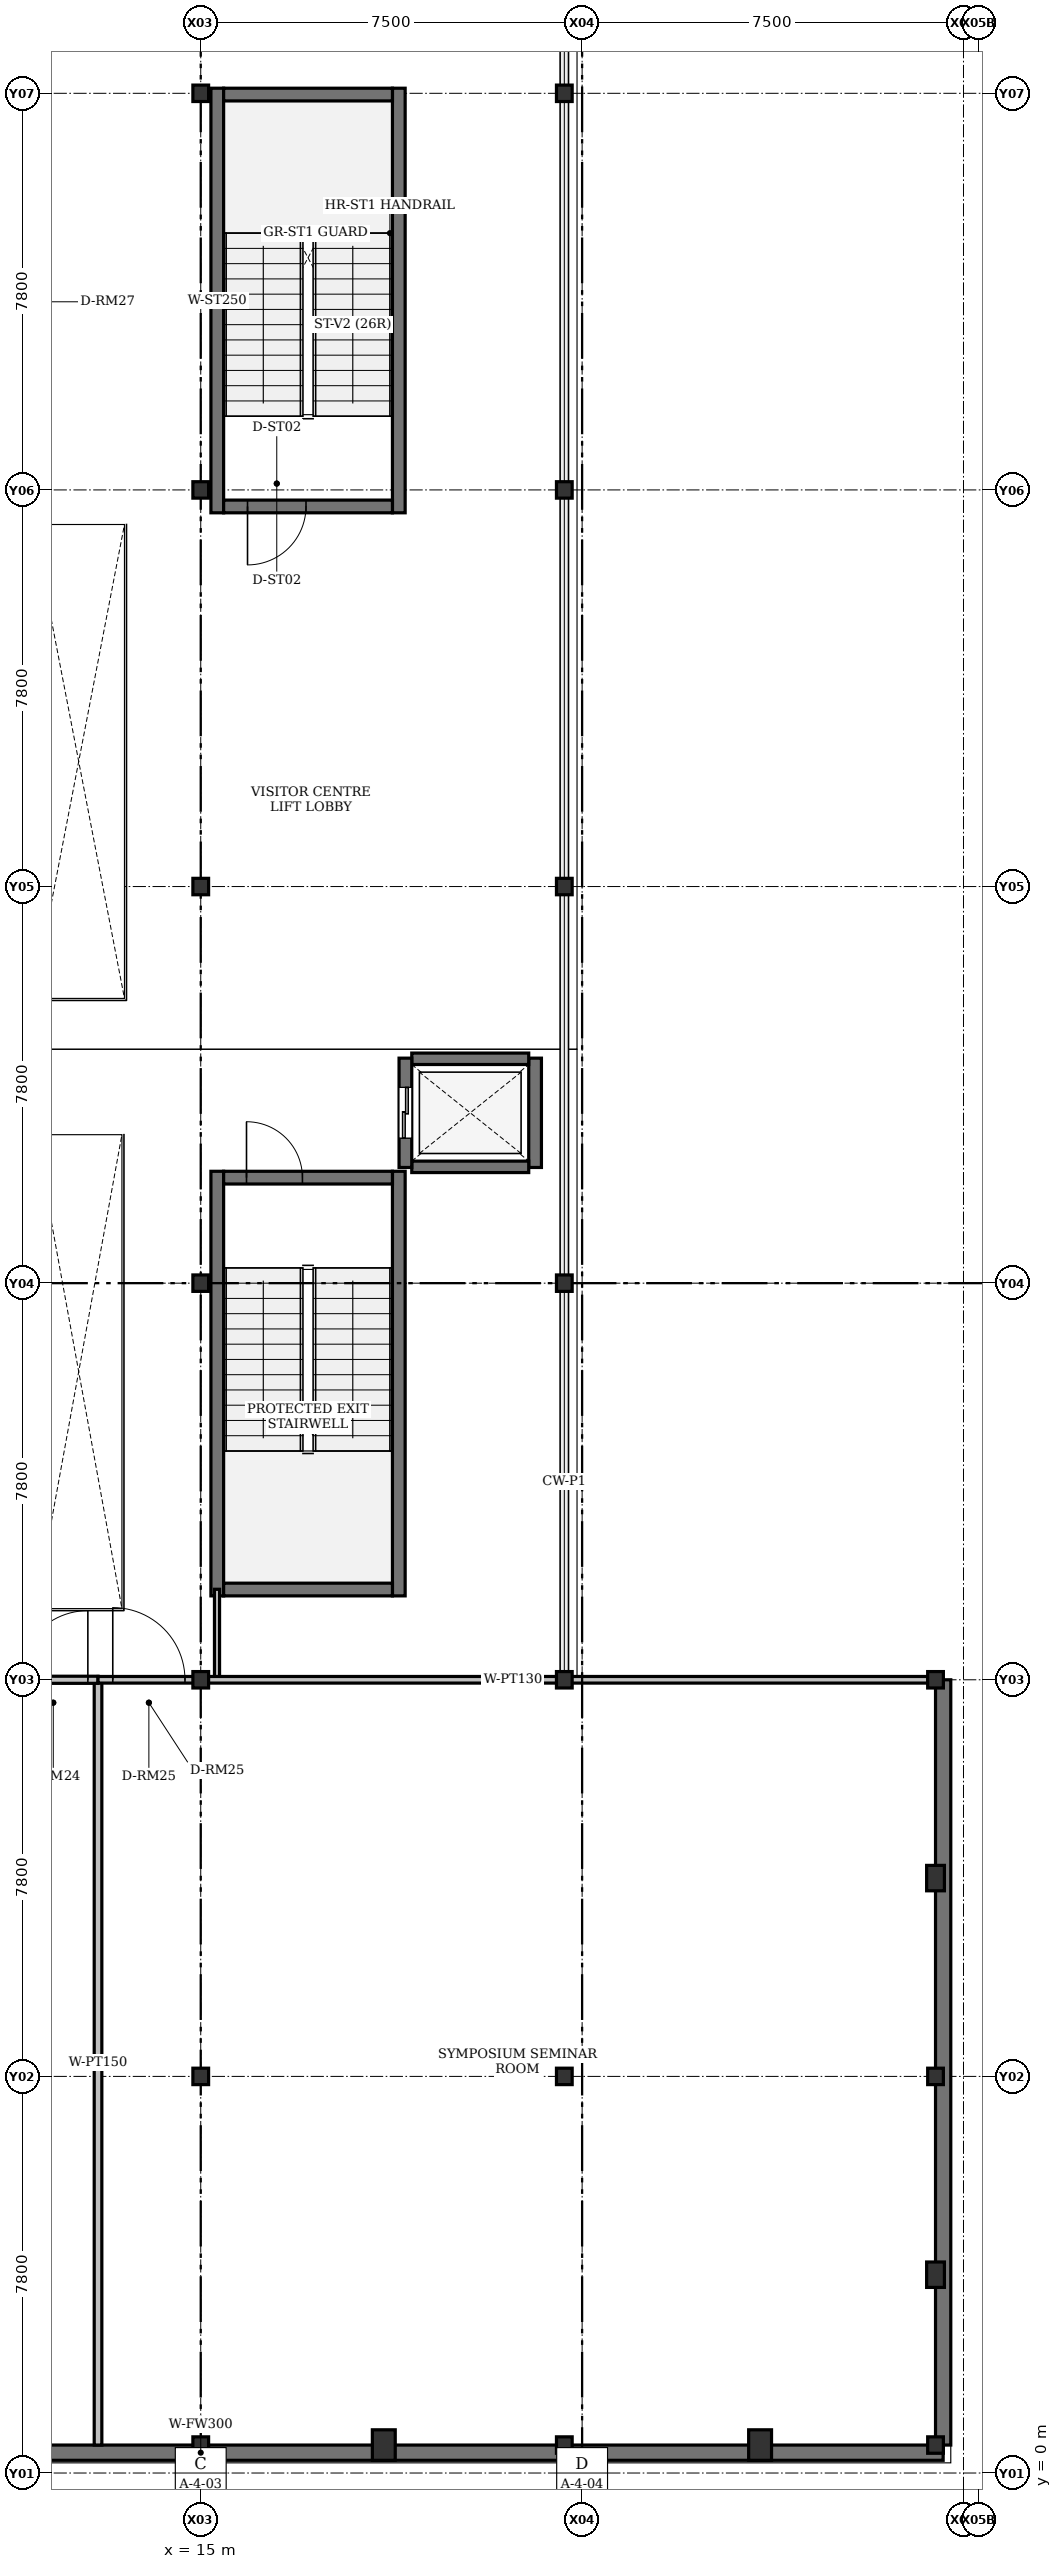
"""IFC4 building model, lengths in metres.
Left out: names, types, materials, properties, quantities, classifications, styles, units other than length and angle.
Written with IfcOpenShell. Run it as: python <this file> out.ifc"""

import sys

from ifc_helpers import new_model, si_unit, direction, frame, frame_2d, origin, origin_2d, place, context, subcontext, project, spatial, rectangle, i_section, extrude, element, fill, save


model = new_model("IFC4")
c1 = context("Model", 3, precision=1e-05, world=origin(), true_north=direction((0.0, 1.0)))
c2 = subcontext(c1, "Body", "Model", "MODEL_VIEW")
j1 = project(units=[si_unit("LENGTHUNIT", "METRE"), si_unit("PLANEANGLEUNIT", "RADIAN")], contexts=[c1])
p1 = place(None, origin())
s1 = spatial("IfcSite", under=j1, at=p1, CompositionType="ELEMENT")
p2 = place(p1, origin())
s2 = spatial("IfcBuilding", under=s1, at=p2, CompositionType="ELEMENT")
p3 = place(p2, frame((0.0, 0.0, 5.4)))
s3 = spatial("IfcBuildingStorey", under=s2, at=p3, CompositionType="ELEMENT", Elevation=5.4)
for number, where, z_axis, x_axis in (
    (1, (15.0, 0.55, 0.0), (0.0, 0.0, 1.0), (1.0, 0.0, 0.0)),
    (2, (15.0, 7.8, 0.0), (0.0, 0.0, 1.0), (1.0, 0.0, 0.0)),
    (3, (15.0, 15.6, 0.0), (0.0, 0.0, 1.0), (1.0, 0.0, 0.0)),
    (4, (15.0, 23.4, 0.0), (0.0, 0.0, 1.0), (1.0, 0.0, 0.0)),
    (5, (15.0, 31.2, 0.0), (0.0, 0.0, 1.0), (1.0, 0.0, 0.0)),
    (6, (15.0, 39.0, 0.0), (0.0, 0.0, 1.0), (1.0, 0.0, 0.0)),
    (7, (15.0, 46.8, 0.0), (0.0, 0.0, 1.0), (1.0, 0.0, 0.0)),
    (8, (22.15, 0.55, 0.0), (0.0, 0.0, 1.0), (1.0, 0.0, 0.0)),
    (9, (22.15, 7.8, 0.0), (0.0, 0.0, 1.0), (1.0, 0.0, 0.0)),
    (10, (22.15, 15.6, 0.0), (0.0, 0.0, 1.0), (1.0, 0.0, 0.0)),
    (11, (22.15, 23.4, 0.0), (0.0, 0.0, 1.0), (1.0, 0.0, 0.0)),
    (12, (22.15, 31.2, 0.0), (0.0, 0.0, 1.0), (1.0, 0.0, 0.0)),
    (13, (22.15, 39.0, 0.0), (0.0, 0.0, 1.0), (1.0, 0.0, 0.0)),
    (14, (22.15, 46.8, 0.0), (0.0, 0.0, 1.0), (1.0, 0.0, 0.0)),
    (15, (29.45, 0.55, 0.0), (0.0, 0.0, 1.0), (1.0, 0.0, 0.0)),
    (16, (29.45, 7.8, 0.0), (0.0, 0.0, 1.0), (1.0, 0.0, 0.0)),
    (17, (29.45, 15.6, 0.0), (0.0, 0.0, 1.0), (1.0, 0.0, 0.0)),
):
    element("IfcColumn", number, at=place(p3, frame(where, z_axis=z_axis, x_axis=x_axis)), inside=s3, PredefinedType="COLUMN", context=c2, shape_type="SweptSolid", body=[
        extrude(i_section(OverallWidth=0.309, OverallDepth=0.323, WebThickness=0.014, FlangeThickness=0.023, FilletRadius=0.015, at=origin_2d()), origin(), (0.0, 0.0, 1.0), 4.5),
    ])
for number, where, z_axis, x_axis in (
    (18, (18.6, 0.55, 0.0), (0.0, 0.0, 1.0), (1.0, 0.0, 0.0)),
    (19, (26.0, 0.55, 0.0), (0.0, 0.0, 1.0), (1.0, 0.0, 0.0)),
):
    element("IfcColumn", number, at=place(p3, frame(where, z_axis=z_axis, x_axis=x_axis)), inside=s3, PredefinedType="PILASTER", context=c2, shape_type="SweptSolid", body=[
        extrude(rectangle(XDim=0.45, YDim=0.6, at=origin_2d()), origin(), (0.0, 0.0, 1.0), 4.5),
    ])
for number, where, z_axis, x_axis in (
    (20, (29.45, 3.9, 0.0), (0.0, 0.0, 1.0), (1.0, 0.0, 0.0)),
    (21, (29.45, 11.7, 0.0), (0.0, 0.0, 1.0), (1.0, 0.0, 0.0)),
):
    element("IfcColumn", number, at=place(p3, frame(where, z_axis=z_axis, x_axis=x_axis)), inside=s3, PredefinedType="PILASTER", context=c2, shape_type="SweptSolid", body=[
        extrude(rectangle(XDim=0.35, YDim=0.5, at=origin_2d()), origin(), (0.0, 0.0, 1.0), 4.5),
    ])
p4 = place(p3, frame((29.6, 0.4, 0.0), z_axis=(0.0, 0.0, 1.0), x_axis=(-1.0, 0.0, 0.0)))
e22 = element("IfcWall", 22, at=p4, inside=s3, PredefinedType="SOLIDWALL", context=c2, shape_type="SweptSolid", body=[
    extrude(rectangle(XDim=29.2, YDim=0.3, at=frame_2d((14.6, 0.0))), origin(), (0.0, 0.0, 1.0), 4.31),
])
p5 = place(p3, frame((29.6, 15.6, 0.0), z_axis=(0.0, 0.0, 1.0), x_axis=(0.0, -1.0, 0.0)))
e23 = element("IfcWall", 23, at=p5, inside=s3, PredefinedType="SOLIDWALL", context=c2, shape_type="SweptSolid", body=[
    extrude(rectangle(XDim=15.05, YDim=0.3, at=frame_2d((7.525, 0.0))), origin(), (0.0, 0.0, 1.0), 4.31),
])
for number, where, z_axis, x_axis in (
    (24, (15.325, 17.25, 0.0), (0.0, 0.0, 1.0), (0.0, 1.0, 0.0)),
    (25, (18.895, 17.25, 0.0), (0.0, 0.0, 1.0), (0.0, 1.0, 0.0)),
):
    element("IfcWall", number, at=place(p3, frame(where, z_axis=z_axis, x_axis=x_axis)), inside=s3, PredefinedType="SHEAR", context=c2, shape_type="SweptSolid", body=[
        extrude(rectangle(XDim=8.35, YDim=0.25, at=frame_2d((4.175, 0.0))), origin(), (0.0, 0.0, 1.0), 4.5),
    ])
p6 = place(p3, frame((15.45, 17.375, 0.0), z_axis=(0.0, 0.0, 1.0), x_axis=(1.0, 0.0, 0.0)))
e26 = element("IfcWall", 26, at=p6, inside=s3, PredefinedType="SHEAR", context=c2, shape_type="SweptSolid", body=[
    extrude(rectangle(XDim=3.32, YDim=0.25, at=frame_2d((1.66, 0.0))), origin(), (0.0, 0.0, 1.0), 4.5),
])
p7 = place(p3, frame((15.45, 25.475, 0.0), z_axis=(0.0, 0.0, 1.0), x_axis=(1.0, 0.0, 0.0)))
e27 = element("IfcWall", 27, at=p7, inside=s3, PredefinedType="SHEAR", context=c2, shape_type="SweptSolid", body=[
    extrude(rectangle(XDim=3.32, YDim=0.25, at=frame_2d((1.66, 0.0))), origin(), (0.0, 0.0, 1.0), 4.5),
])
p8 = place(p7, frame((0.45, 0.0, 0.0)))
e28 = element("IfcOpeningElement", 28, at=p8, cuts=e27, PredefinedType="OPENING", context=c2, shape_type="SweptSolid", body=[
    extrude(rectangle(XDim=1.1, YDim=2.15, at=frame_2d((0.55, 1.075))), frame((0.0, 0.125, 0.0), z_axis=(0.0, -1.0, 0.0), x_axis=(1.0, 0.0, 0.0)), (0.0, 0.0, 1.0), 0.25),
])
for number, where, z_axis, x_axis in (
    (29, (15.325, 38.55, 0.0), (0.0, 0.0, 1.0), (0.0, 1.0, 0.0)),
    (30, (18.895, 38.55, 0.0), (0.0, 0.0, 1.0), (0.0, 1.0, 0.0)),
):
    element("IfcWall", number, at=place(p3, frame(where, z_axis=z_axis, x_axis=x_axis)), inside=s3, PredefinedType="SHEAR", context=c2, shape_type="SweptSolid", body=[
        extrude(rectangle(XDim=8.35, YDim=0.25, at=frame_2d((4.175, 0.0))), origin(), (0.0, 0.0, 1.0), 4.5),
    ])
p9 = place(p3, frame((15.45, 46.775, 0.0), z_axis=(0.0, 0.0, 1.0), x_axis=(1.0, 0.0, 0.0)))
e31 = element("IfcWall", 31, at=p9, inside=s3, PredefinedType="SHEAR", context=c2, shape_type="SweptSolid", body=[
    extrude(rectangle(XDim=3.32, YDim=0.25, at=frame_2d((1.66, 0.0))), origin(), (0.0, 0.0, 1.0), 4.5),
])
p10 = place(p3, frame((18.77, 38.675, 0.0), z_axis=(0.0, 0.0, 1.0), x_axis=(-1.0, 0.0, 0.0)))
e32 = element("IfcWall", 32, at=p10, inside=s3, PredefinedType="SHEAR", context=c2, shape_type="SweptSolid", body=[
    extrude(rectangle(XDim=3.32, YDim=0.25, at=frame_2d((1.66, 0.0))), origin(), (0.0, 0.0, 1.0), 4.5),
])
p11 = place(p10, frame((1.7, 0.0, 0.0)))
e33 = element("IfcOpeningElement", 33, at=p11, cuts=e32, PredefinedType="OPENING", context=c2, shape_type="SweptSolid", body=[
    extrude(rectangle(XDim=1.15, YDim=2.15, at=frame_2d((0.575, 1.075))), frame((0.0, 0.125, 0.0), z_axis=(0.0, -1.0, 0.0), x_axis=(1.0, 0.0, 0.0)), (0.0, 0.0, 1.0), 0.25),
])
p12 = place(p3, frame((21.575, 25.675, 0.0), z_axis=(0.0, 0.0, 1.0), x_axis=(0.0, 1.0, 0.0)))
e34 = element("IfcWall", 34, at=p12, inside=s3, PredefinedType="SHEAR", context=c2, shape_type="SweptSolid", body=[
    extrude(rectangle(XDim=2.15, YDim=0.25, at=frame_2d((1.075, 0.0))), origin(), (0.0, 0.0, 1.0), 4.5),
])
for number, where, z_axis, x_axis in (
    (35, (19.15, 25.688, 0.0), (0.0, 0.0, 1.0), (1.0, 0.0, 0.0)),
    (36, (19.15, 27.812, 0.0), (0.0, 0.0, 1.0), (1.0, 0.0, 0.0)),
):
    element("IfcWall", number, at=place(p3, frame(where, z_axis=z_axis, x_axis=x_axis)), inside=s3, PredefinedType="SHEAR", context=c2, shape_type="SweptSolid", body=[
        extrude(rectangle(XDim=2.3, YDim=0.225, at=frame_2d((1.15, 0.0))), origin(), (0.0, 0.0, 1.0), 4.5),
    ])
p13 = place(p3, frame((19.025, 25.675, 0.0), z_axis=(0.0, 0.0, 1.0), x_axis=(0.0, 1.0, 0.0)))
e37 = element("IfcWall", 37, at=p13, inside=s3, PredefinedType="SHEAR", context=c2, shape_type="SweptSolid", body=[
    extrude(rectangle(XDim=2.15, YDim=0.25, at=frame_2d((1.075, 0.0))), origin(), (0.0, 0.0, 1.0), 4.5),
])
p14 = place(p13, frame((0.575, 0.0, 0.0)))
e38 = element("IfcOpeningElement", 38, at=p14, cuts=e37, PredefinedType="OPENING", context=c2, shape_type="SweptSolid", body=[
    extrude(rectangle(XDim=1.0, YDim=2.1, at=frame_2d((0.5, 1.05))), frame((0.0, 0.125, 0.0), z_axis=(0.0, -1.0, 0.0), x_axis=(1.0, 0.0, 0.0)), (0.0, 0.0, 1.0), 0.25),
])
p15 = place(p3, frame((15.32, 15.6, 0.0), z_axis=(0.0, 0.0, 1.0), x_axis=(0.0, 1.0, 0.0)))
e39 = element("IfcWall", 39, at=p15, inside=s3, PredefinedType="PARTITIONING", context=c2, shape_type="SweptSolid", body=[
    extrude(rectangle(XDim=1.78, YDim=0.1, at=frame_2d((0.89, 0.0))), origin(), (0.0, 0.0, 1.0), 3.756),
])
p16 = place(p3, frame((12.98, 0.55, 0.0), z_axis=(0.0, 0.0, 1.0), x_axis=(0.0, 1.0, 0.0)))
e40 = element("IfcWall", 40, at=p16, inside=s3, PredefinedType="PARTITIONING", context=c2, shape_type="SweptSolid", body=[
    extrude(rectangle(XDim=15.05, YDim=0.15, at=frame_2d((7.525, 0.0))), origin(), (0.0, 0.0, 1.0), 3.756),
])
p17 = place(p3, frame((0.65, 15.6, 0.0), z_axis=(0.0, 0.0, 1.0), x_axis=(1.0, 0.0, 0.0)))
e41 = element("IfcWall", 41, at=p17, inside=s3, PredefinedType="PARTITIONING", context=c2, shape_type="SweptSolid", body=[
    extrude(rectangle(XDim=12.33, YDim=0.14, at=frame_2d((6.165, 0.0))), origin(), (0.0, 0.0, 1.0), 3.756),
])
p18 = place(p17, frame((10.77, 0.0, 0.0)))
e42 = element("IfcOpeningElement", 42, at=p18, cuts=e41, PredefinedType="OPENING", context=c2, shape_type="SweptSolid", body=[
    extrude(rectangle(XDim=1.36, YDim=2.25, at=frame_2d((0.68, 1.125))), frame((0.0, 0.07, 0.0), z_axis=(0.0, -1.0, 0.0), x_axis=(1.0, 0.0, 0.0)), (0.0, 0.0, 1.0), 0.14),
])
p19 = place(p3, frame((12.98, 15.6, 0.0), z_axis=(0.0, 0.0, 1.0), x_axis=(1.0, 0.0, 0.0)))
e43 = element("IfcWall", 43, at=p19, inside=s3, PredefinedType="PARTITIONING", context=c2, shape_type="SweptSolid", body=[
    extrude(rectangle(XDim=16.321, YDim=0.13, at=frame_2d((8.16, 0.0))), origin(), (0.0, 0.0, 1.0), 3.756),
])
p20 = place(p19, frame((0.29, 0.0, 0.0)))
e44 = element("IfcOpeningElement", 44, at=p20, cuts=e43, PredefinedType="OPENING", context=c2, shape_type="SweptSolid", body=[
    extrude(rectangle(XDim=1.42, YDim=2.3, at=frame_2d((0.71, 1.15))), frame((0.0, 0.065, 0.0), z_axis=(0.0, -1.0, 0.0), x_axis=(1.0, 0.0, 0.0)), (0.0, 0.0, 1.0), 0.13),
])
p21 = place(p8, origin())
e45 = element("IfcDoor", 45, at=p21, inside=s3, OperationType="SINGLE_SWING_LEFT", PredefinedType="DOOR", context=c2, shape_type="SweptSolid", body=[
    extrude(rectangle(XDim=1.1, YDim=2.15, at=frame_2d((0.55, 1.075))), frame((0.0, 0.025, 0.0), z_axis=(0.0, -1.0, 0.0), x_axis=(1.0, 0.0, 0.0)), (0.0, 0.0, 1.0), 0.05),
])
fill(e28, e45)
p22 = place(p11, origin())
e46 = element("IfcDoor", 46, at=p22, inside=s3, OperationType="SINGLE_SWING_RIGHT", PredefinedType="DOOR", context=c2, shape_type="SweptSolid", body=[
    extrude(rectangle(XDim=1.15, YDim=2.15, at=frame_2d((0.575, 1.075))), frame((0.0, 0.025, 0.0), z_axis=(0.0, -1.0, 0.0), x_axis=(1.0, 0.0, 0.0)), (0.0, 0.0, 1.0), 0.05),
])
fill(e33, e46)
p23 = place(p14, origin())
e47 = element("IfcDoor", 47, at=p23, inside=s3, OperationType="SLIDING_TO_LEFT", PredefinedType="DOOR", context=c2, shape_type="SweptSolid", body=[
    extrude(rectangle(XDim=1.0, YDim=2.1, at=frame_2d((0.5, 1.05))), frame((0.0, 0.025, 0.0), z_axis=(0.0, -1.0, 0.0), x_axis=(1.0, 0.0, 0.0)), (0.0, 0.0, 1.0), 0.05),
])
fill(e38, e47)
p24 = place(p18, origin())
e48 = element("IfcDoor", 48, at=p24, inside=s3, OperationType="SINGLE_SWING_RIGHT", PredefinedType="DOOR", context=c2, shape_type="SweptSolid", body=[
    extrude(rectangle(XDim=1.36, YDim=2.25, at=frame_2d((0.68, 1.125))), frame((0.0, 0.025, 0.0), z_axis=(0.0, -1.0, 0.0), x_axis=(1.0, 0.0, 0.0)), (0.0, 0.0, 1.0), 0.05),
])
fill(e42, e48)
p25 = place(p20, origin())
e49 = element("IfcDoor", 49, at=p25, inside=s3, OperationType="SINGLE_SWING_LEFT", PredefinedType="DOOR", context=c2, shape_type="SweptSolid", body=[
    extrude(rectangle(XDim=1.42, YDim=2.3, at=frame_2d((0.71, 1.15))), frame((0.0, 0.025, 0.0), z_axis=(0.0, -1.0, 0.0), x_axis=(1.0, 0.0, 0.0)), (0.0, 0.0, 1.0), 0.05),
])
fill(e44, e49)
save(model, sys.argv[1])
